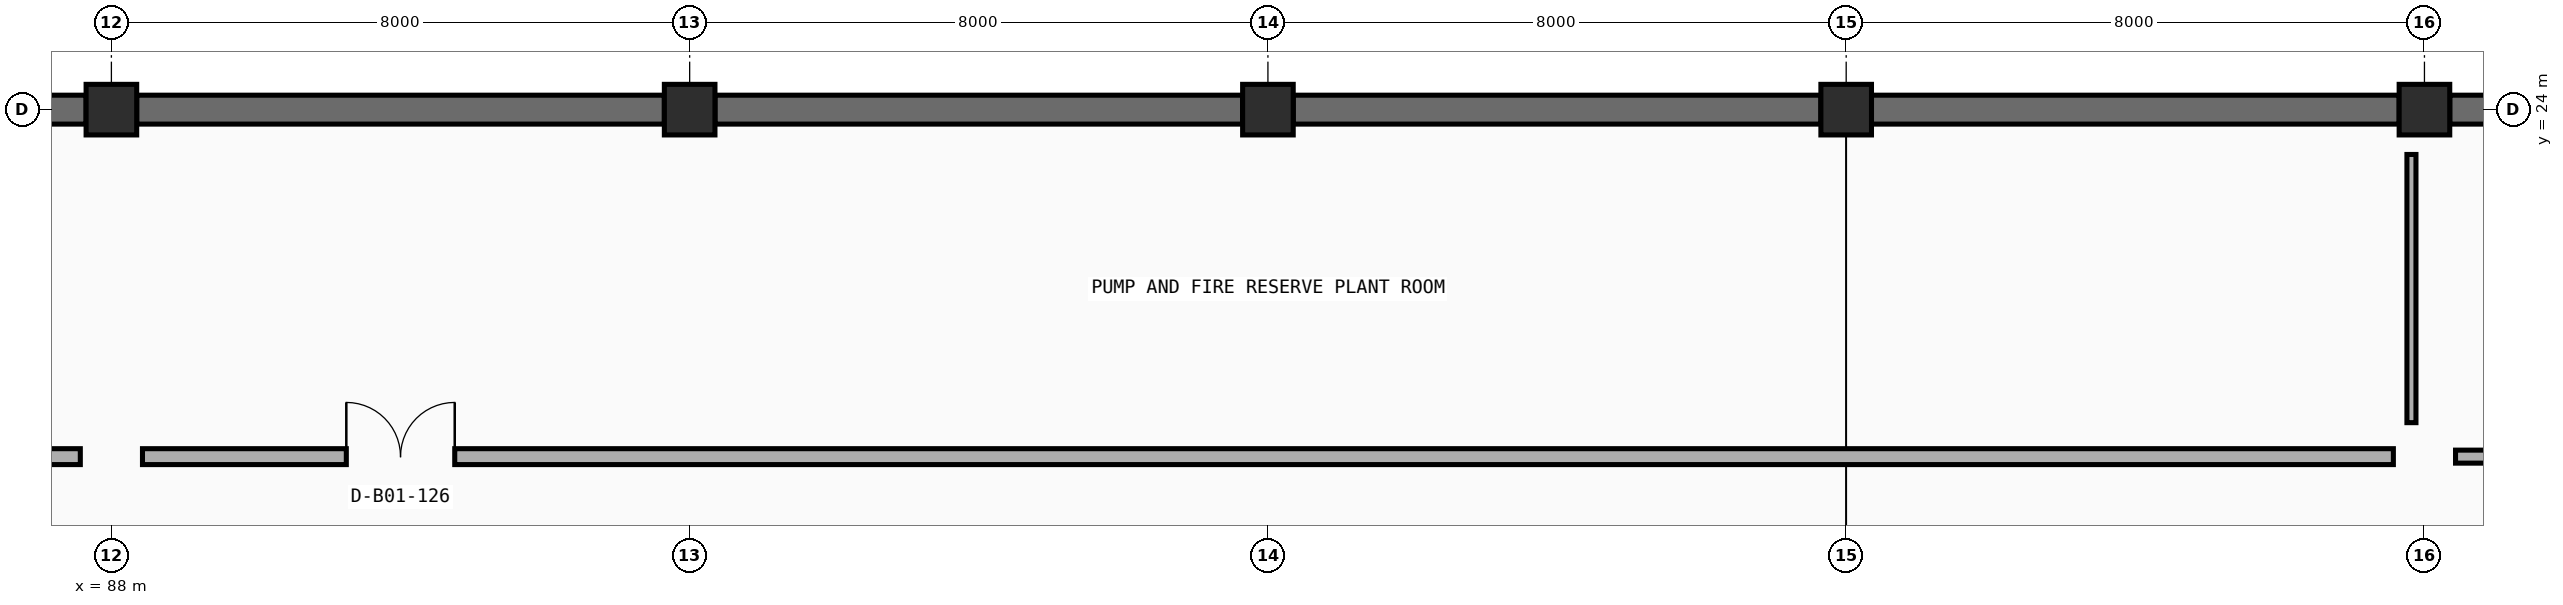
"""IFC4 building model, lengths in metres.
Left out: names, types, materials, properties, quantities, classifications, styles, units other than length and angle.
Written with IfcOpenShell. Run it as: python <this file> out.ifc"""

import sys

from ifc_helpers import new_model, si_unit, direction, frame, frame_2d, origin, origin_2d, place, context, subcontext, project, spatial, rectangle, extrude, element, fill, save


model = new_model("IFC4")
c1 = context("Model", 3, precision=1e-05, world=origin(), true_north=direction((0.0, 1.0)))
c2 = subcontext(c1, "Body", "Model", "MODEL_VIEW")
j1 = project(units=[si_unit("LENGTHUNIT", "METRE"), si_unit("PLANEANGLEUNIT", "RADIAN")], contexts=[c1])
p1 = place(None, origin())
s1 = spatial("IfcSite", under=j1, at=p1, CompositionType="ELEMENT")
p2 = place(p1, origin())
s2 = spatial("IfcBuilding", under=s1, at=p2, CompositionType="ELEMENT")
p3 = place(p2, frame((0.0, 0.0, -4.5)))
s3 = spatial("IfcBuildingStorey", under=s2, at=p3, CompositionType="ELEMENT", Elevation=-4.5)
for number, where, z_axis, x_axis in (
    (1, (88.0, 24.0, -0.405), (0.0, 0.0, 1.0), (1.0, 0.0, 0.0)),
    (2, (96.0, 24.0, -0.405), (0.0, 0.0, 1.0), (1.0, 0.0, 0.0)),
    (3, (104.0, 24.0, -0.405), (0.0, 0.0, 1.0), (1.0, 0.0, 0.0)),
    (4, (112.0, 24.0, -0.405), (0.0, 0.0, 1.0), (1.0, 0.0, 0.0)),
    (5, (120.0, 24.0, -0.405), (0.0, 0.0, 1.0), (1.0, 0.0, 0.0)),
):
    element("IfcColumn", number, at=place(p3, frame(where, z_axis=z_axis, x_axis=x_axis)), inside=s3, PredefinedType="COLUMN", context=c2, shape_type="SweptSolid", body=[
        extrude(rectangle(XDim=0.7, YDim=0.7, at=origin_2d()), origin(), (0.0, 0.0, 1.0), 4.905),
    ])
for number, where, z_axis, x_axis in (
    (6, (80.35, 24.0, 0.0), (0.0, 0.0, 1.0), (1.0, 0.0, 0.0)),
    (7, (88.35, 24.0, 0.0), (0.0, 0.0, 1.0), (1.0, 0.0, 0.0)),
    (8, (96.35, 24.0, 0.0), (0.0, 0.0, 1.0), (1.0, 0.0, 0.0)),
    (9, (104.35, 24.0, 0.0), (0.0, 0.0, 1.0), (1.0, 0.0, 0.0)),
    (10, (112.35, 24.0, 0.0), (0.0, 0.0, 1.0), (1.0, 0.0, 0.0)),
    (11, (120.35, 24.0, 0.0), (0.0, 0.0, 1.0), (1.0, 0.0, 0.0)),
):
    element("IfcWall", number, at=place(p3, frame(where, z_axis=z_axis, x_axis=x_axis)), inside=s3, PredefinedType="USERDEFINED", context=c2, shape_type="SweptSolid", body=[
        extrude(rectangle(XDim=7.3, YDim=0.4, at=frame_2d((3.65, 0.0))), origin(), (0.0, 0.0, 1.0), 4.095),
    ])
p4 = place(p3, frame((56.43, 19.2, 0.0), z_axis=(0.0, 0.0, 1.0), x_axis=(1.0, 0.0, 0.0)))
e12 = element("IfcWall", 12, at=p4, inside=s3, PredefinedType="PARTITIONING", context=c2, shape_type="SweptSolid", body=[
    extrude(rectangle(XDim=31.14, YDim=0.22, at=frame_2d((15.57, 0.0))), origin(), (0.0, 0.0, 1.0), 3.6),
])
p5 = place(p4, frame((2.82, 0.0, 0.0)))
e13 = element("IfcOpeningElement", 13, at=p5, cuts=e12, PredefinedType="OPENING", context=c2, shape_type="SweptSolid", body=[
    extrude(rectangle(XDim=1.5, YDim=2.2, at=frame_2d((0.75, 1.1))), frame((0.0, 0.12, 0.0), z_axis=(0.0, -1.0, 0.0), x_axis=(1.0, 0.0, 0.0)), (0.0, 0.0, 1.0), 0.24),
])
p6 = place(p3, frame((88.43, 19.2, 0.0), z_axis=(0.0, 0.0, 1.0), x_axis=(1.0, 0.0, 0.0)))
e14 = element("IfcWall", 14, at=p6, inside=s3, PredefinedType="PARTITIONING", context=c2, shape_type="SweptSolid", body=[
    extrude(rectangle(XDim=31.14, YDim=0.22, at=frame_2d((15.57, 0.0))), origin(), (0.0, 0.0, 1.0), 3.6),
])
p7 = place(p6, frame((2.82, 0.0, 0.0)))
e15 = element("IfcOpeningElement", 15, at=p7, cuts=e14, PredefinedType="OPENING", context=c2, shape_type="SweptSolid", body=[
    extrude(rectangle(XDim=1.5, YDim=2.2, at=frame_2d((0.75, 1.1))), frame((0.0, 0.12, 0.0), z_axis=(0.0, -1.0, 0.0), x_axis=(1.0, 0.0, 0.0)), (0.0, 0.0, 1.0), 0.24),
])
p8 = place(p3, frame((119.82, 19.67, 0.0), z_axis=(0.0, 0.0, 1.0), x_axis=(0.0, 1.0, 0.0)))
e16 = element("IfcWall", 16, at=p8, inside=s3, PredefinedType="PARTITIONING", context=c2, shape_type="SweptSolid", body=[
    extrude(rectangle(XDim=3.71, YDim=0.125, at=frame_2d((1.855, 0.0))), origin(), (0.0, 0.0, 1.0), 3.27),
])
p9 = place(p3, frame((120.43, 19.2, 0.0), z_axis=(0.0, 0.0, 1.0), x_axis=(1.0, 0.0, 0.0)))
e17 = element("IfcWall", 17, at=p9, inside=s3, PredefinedType="PARTITIONING", context=c2, shape_type="SweptSolid", body=[
    extrude(rectangle(XDim=31.14, YDim=0.18, at=frame_2d((15.57, 0.0))), origin(), (0.0, 0.0, 1.0), 3.6),
])
p10 = place(p9, frame((3.07, 0.0, 0.0)))
e18 = element("IfcOpeningElement", 18, at=p10, cuts=e17, PredefinedType="OPENING", context=c2, shape_type="SweptSolid", body=[
    extrude(rectangle(XDim=1.0, YDim=2.15, at=frame_2d((0.5, 1.075))), frame((0.0, 0.1, 0.0), z_axis=(0.0, -1.0, 0.0), x_axis=(1.0, 0.0, 0.0)), (0.0, 0.0, 1.0), 0.2),
])
p11 = place(p7, origin())
e19 = element("IfcDoor", 19, at=p11, inside=s3, OperationType="DOUBLE_DOOR_SINGLE_SWING", PredefinedType="DOOR", context=c2, shape_type="SweptSolid", body=[
    extrude(rectangle(XDim=1.5, YDim=2.2, at=frame_2d((0.75, 1.1))), frame((0.0, 0.025, 0.0), z_axis=(0.0, -1.0, 0.0), x_axis=(1.0, 0.0, 0.0)), (0.0, 0.0, 1.0), 0.05),
])
fill(e15, e19)
save(model, sys.argv[1])
